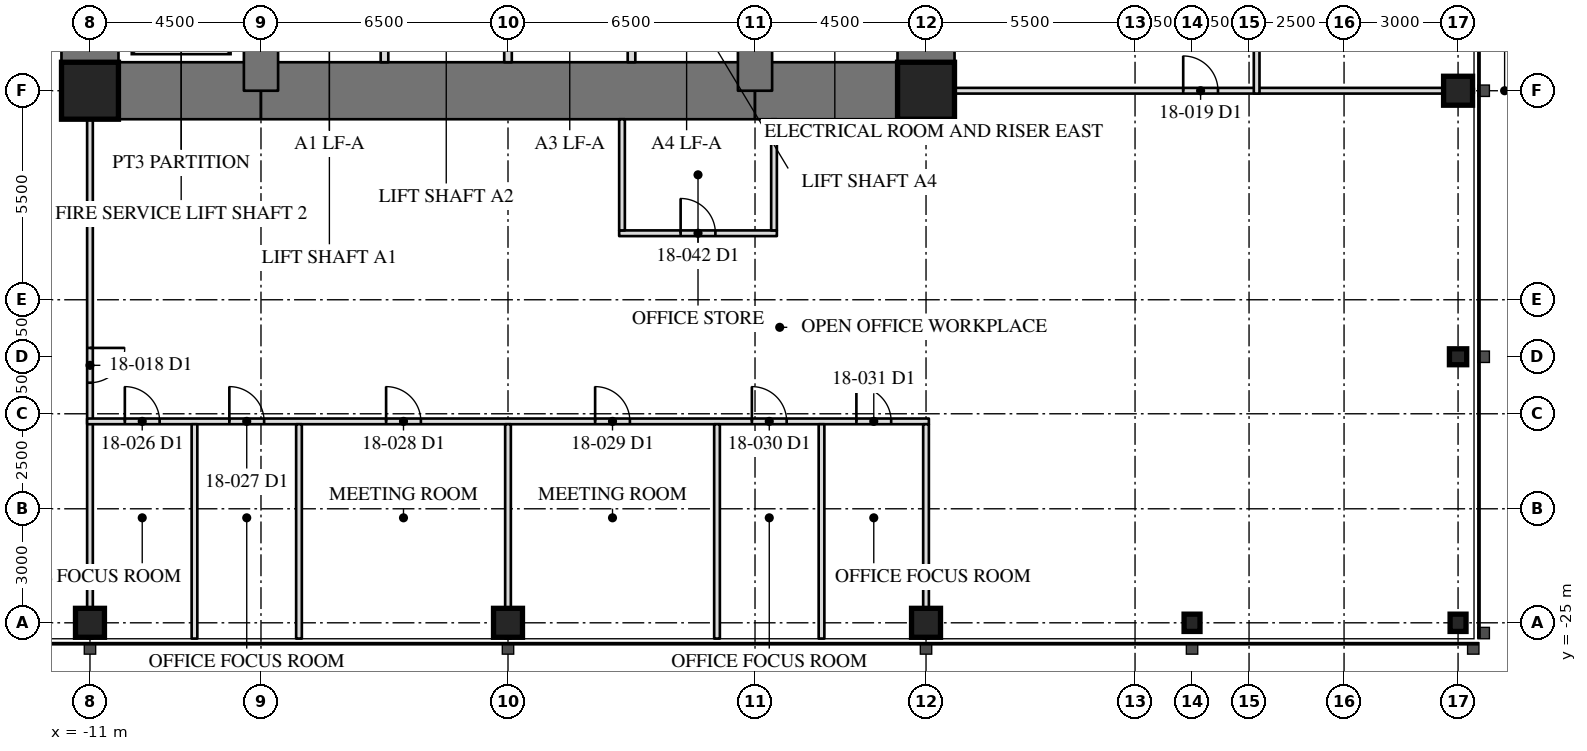
"""IFC4 building model, lengths in metres.
Left out: names, types, materials, properties, quantities, classifications, styles, units other than length and angle.
Written with IfcOpenShell. Run it as: python <this file> out.ifc"""

import sys

from ifc_helpers import new_model, si_unit, direction, frame, frame_2d, origin, origin_2d, place, context, subcontext, project, spatial, rectangle, hollow_rectangle, i_section, extrude, element, fill, save


model = new_model("IFC4")
c1 = context("Model", 3, precision=1e-05, world=origin(), true_north=direction((0.0, 1.0)))
c2 = subcontext(c1, "Body", "Model", "MODEL_VIEW")
j1 = project(units=[si_unit("LENGTHUNIT", "METRE"), si_unit("PLANEANGLEUNIT", "RADIAN")], contexts=[c1])
p1 = place(None, origin())
s1 = spatial("IfcSite", under=j1, at=p1, CompositionType="ELEMENT")
p2 = place(p1, origin())
s2 = spatial("IfcBuilding", under=s1, at=p2, CompositionType="ELEMENT")
p3 = place(p2, frame((0.0, 0.0, 77.5)))
s3 = spatial("IfcBuildingStorey", under=s2, at=p3, CompositionType="ELEMENT", Elevation=77.5)
for number, where, z_axis, x_axis in (
    (1, (-11.0, -25.0, 0.0), (0.0, 0.0, 1.0), (1.0, 0.0, 0.0)),
    (2, (0.0, -25.0, 0.0), (0.0, 0.0, 1.0), (1.0, 0.0, 0.0)),
    (3, (11.0, -25.0, 0.0), (0.0, 0.0, 1.0), (1.0, 0.0, 0.0)),
):
    element("IfcColumn", number, at=place(p3, frame(where, z_axis=z_axis, x_axis=x_axis)), inside=s3, PredefinedType="COLUMN", context=c2, shape_type="SweptSolid", body=[
        extrude(hollow_rectangle(XDim=0.762, YDim=0.762, WallThickness=0.127, at=origin_2d()), origin(), (0.0, 0.0, 1.0), 4.1),
    ])
for number, where, z_axis, x_axis in (
    (4, (18.0, -25.0, 0.0), (0.0, 0.0, 1.0), (1.0, 0.0, 0.0)),
    (5, (25.0, -25.0, 0.0), (0.0, 0.0, 1.0), (1.0, 0.0, 0.0)),
    (6, (25.0, -18.0, 0.0), (0.0, 0.0, 1.0), (0.0, 1.0, 0.0)),
):
    element("IfcColumn", number, at=place(p3, frame(where, z_axis=z_axis, x_axis=x_axis)), inside=s3, PredefinedType="COLUMN", context=c2, shape_type="SweptSolid", body=[
        extrude(i_section(OverallWidth=0.419, OverallDepth=0.455, WebThickness=0.042, FlangeThickness=0.068, at=origin_2d()), origin(), (0.0, 0.0, 1.0), 4.1),
    ])
p4 = place(p3, frame((25.0, -11.0, 0.0), z_axis=(0.0, 0.0, 1.0), x_axis=(0.0, 1.0, 0.0)))
e7 = element("IfcColumn", 7, at=p4, inside=s3, PredefinedType="COLUMN", context=c2, shape_type="SweptSolid", body=[
    extrude(hollow_rectangle(XDim=0.762, YDim=0.762, WallThickness=0.127, at=origin_2d()), origin(), (0.0, 0.0, 1.0), 4.1),
])
p5 = place(p3, frame((11.0, -11.0, 0.0), z_axis=(0.0, 0.0, 1.0), x_axis=(0.0, 1.0, 0.0)))
e8 = element("IfcWall", 8, at=p5, inside=s3, PredefinedType="SHEAR", context=c2, shape_type="SweptSolid", body=[
    extrude(rectangle(XDim=22.0, YDim=1.5, at=frame_2d((11.0, 0.0))), origin(), (0.0, 0.0, 1.0), 4.1),
])
p6 = place(p5, frame((15.393, 0.0, 0.0)))
e9 = element("IfcOpeningElement", 9, at=p6, cuts=e8, PredefinedType="OPENING", context=c2, shape_type="SweptSolid", body=[
    extrude(rectangle(XDim=0.915, YDim=2.134, at=frame_2d((0.458, 1.067))), frame((0.0, 0.76, 0.0), z_axis=(0.0, -1.0, 0.0), x_axis=(1.0, 0.0, 0.0)), (0.0, 0.0, 1.0), 1.52),
])
p7 = place(p3, frame((-11.0, 11.0, 0.0), z_axis=(0.0, 0.0, 1.0), x_axis=(0.0, -1.0, 0.0)))
e10 = element("IfcWall", 10, at=p7, inside=s3, PredefinedType="SHEAR", context=c2, shape_type="SweptSolid", body=[
    extrude(rectangle(XDim=22.0, YDim=1.5, at=frame_2d((11.0, 0.0))), origin(), (0.0, 0.0, 1.0), 4.1),
])
p8 = place(p7, frame((15.393, 0.0, 0.0)))
e11 = element("IfcOpeningElement", 11, at=p8, cuts=e10, PredefinedType="OPENING", context=c2, shape_type="SweptSolid", body=[
    extrude(rectangle(XDim=0.915, YDim=2.134, at=frame_2d((0.458, 1.067))), frame((0.0, 0.76, 0.0), z_axis=(0.0, -1.0, 0.0), x_axis=(1.0, 0.0, 0.0)), (0.0, 0.0, 1.0), 1.52),
])
p9 = place(p3, frame((-11.0, -11.0, 0.0), z_axis=(0.0, 0.0, 1.0), x_axis=(1.0, 0.0, 0.0)))
e12 = element("IfcWall", 12, at=p9, inside=s3, PredefinedType="SHEAR", context=c2, shape_type="SweptSolid", body=[
    extrude(rectangle(XDim=4.5, YDim=1.5, at=frame_2d((2.25, 0.0))), origin(), (0.0, 0.0, 1.0), 4.1),
])
p10 = place(p3, frame((-6.5, -11.0, 0.0), z_axis=(0.0, 0.0, 1.0), x_axis=(1.0, 0.0, 0.0)))
e13 = element("IfcWall", 13, at=p10, inside=s3, PredefinedType="SHEAR", context=c2, shape_type="SweptSolid", body=[
    extrude(rectangle(XDim=13.0, YDim=1.5, at=frame_2d((6.5, 0.0))), origin(), (0.0, 0.0, 1.0), 4.1),
])
p11 = place(p3, frame((6.5, -11.0, 0.0), z_axis=(0.0, 0.0, 1.0), x_axis=(1.0, 0.0, 0.0)))
e14 = element("IfcWall", 14, at=p11, inside=s3, PredefinedType="SHEAR", context=c2, shape_type="SweptSolid", body=[
    extrude(rectangle(XDim=4.5, YDim=1.5, at=frame_2d((2.25, 0.0))), origin(), (0.0, 0.0, 1.0), 4.1),
])
for number, where, z_axis, x_axis in (
    (15, (6.5, -11.0, 0.0), (0.0, 0.0, 1.0), (0.0, 1.0, 0.0)),
    (16, (-6.5, -6.5, 0.0), (0.0, 0.0, 1.0), (0.0, -1.0, 0.0)),
):
    element("IfcWall", number, at=place(p3, frame(where, z_axis=z_axis, x_axis=x_axis)), inside=s3, PredefinedType="SHEAR", context=c2, shape_type="SweptSolid", body=[
        extrude(rectangle(XDim=4.5, YDim=0.9, at=frame_2d((2.25, 0.0))), origin(), (0.0, 0.0, 1.0), 4.1),
    ])
for number, where, z_axis, x_axis in (
    (17, (-11.0, -11.0, 0.0), (0.0, 0.0, 1.0), (1.0, 0.0, 0.0)),
    (18, (11.0, -11.0, 0.0), (0.0, 0.0, 1.0), (1.0, 0.0, 0.0)),
):
    element("IfcColumn", number, at=place(p3, frame(where, z_axis=z_axis, x_axis=x_axis)), inside=s3, PredefinedType="COLUMN", context=c2, shape_type="SweptSolid", body=[
        extrude(hollow_rectangle(XDim=1.499, YDim=1.499, WallThickness=0.102, at=origin_2d()), origin(), (0.0, 0.0, 1.0), 4.1),
    ])
for number, where, z_axis, x_axis in (
    (19, (-3.25, -10.25, 0.0), (0.0, 0.0, 1.0), (0.0, 1.0, 0.0)),
    (20, (0.0, -10.25, 0.0), (0.0, 0.0, 1.0), (0.0, 1.0, 0.0)),
    (21, (3.25, -10.25, 0.0), (0.0, 0.0, 1.0), (0.0, 1.0, 0.0)),
):
    element("IfcWall", number, at=place(p3, frame(where, z_axis=z_axis, x_axis=x_axis)), inside=s3, PredefinedType="PARTITIONING", context=c2, shape_type="SweptSolid", body=[
        extrude(rectangle(XDim=3.3, YDim=0.2, at=frame_2d((1.65, 0.0))), origin(), (0.0, 0.0, 1.0), 3.91),
    ])
p12 = place(p3, frame((-11.0, -11.75, 0.0), z_axis=(0.0, 0.0, 1.0), x_axis=(0.0, -1.0, 0.0)))
e22 = element("IfcWall", 22, at=p12, inside=s3, PredefinedType="PARTITIONING", context=c2, shape_type="SweptSolid", body=[
    extrude(rectangle(XDim=13.665, YDim=0.15, at=frame_2d((6.833, 0.0))), origin(), (0.0, 0.0, 1.0), 3.13),
])
p13 = place(p12, frame((6.018, 0.0, 0.0)))
e23 = element("IfcOpeningElement", 23, at=p13, cuts=e22, PredefinedType="OPENING", context=c2, shape_type="SweptSolid", body=[
    extrude(rectangle(XDim=0.915, YDim=2.134, at=frame_2d((0.458, 1.067))), frame((0.0, 0.085, 0.0), z_axis=(0.0, -1.0, 0.0), x_axis=(1.0, 0.0, 0.0)), (0.0, 0.0, 1.0), 0.17),
])
p14 = place(p3, frame((11.75, -11.0, 0.0), z_axis=(0.0, 0.0, 1.0), x_axis=(1.0, 0.0, 0.0)))
e24 = element("IfcWall", 24, at=p14, inside=s3, PredefinedType="PARTITIONING", context=c2, shape_type="SweptSolid", body=[
    extrude(rectangle(XDim=13.665, YDim=0.15, at=frame_2d((6.833, 0.0))), origin(), (0.0, 0.0, 1.0), 3.13),
])
p15 = place(p14, frame((6.018, 0.0, 0.0)))
e25 = element("IfcOpeningElement", 25, at=p15, cuts=e24, PredefinedType="OPENING", context=c2, shape_type="SweptSolid", body=[
    extrude(rectangle(XDim=0.915, YDim=2.134, at=frame_2d((0.458, 1.067))), frame((0.0, 0.085, 0.0), z_axis=(0.0, -1.0, 0.0), x_axis=(1.0, 0.0, 0.0)), (0.0, 0.0, 1.0), 0.17),
])
p16 = place(p3, frame((-11.075, -19.7, 0.0), z_axis=(0.0, 0.0, 1.0), x_axis=(1.0, 0.0, 0.0)))
e26 = element("IfcWall", 26, at=p16, inside=s3, PredefinedType="PARTITIONING", context=c2, shape_type="SweptSolid", body=[
    extrude(rectangle(XDim=22.15, YDim=0.15, at=frame_2d((11.075, 0.0))), origin(), (0.0, 0.0, 1.0), 3.91),
])
p17 = place(p16, frame((0.992, 0.0, 0.0)))
e27 = element("IfcOpeningElement", 27, at=p17, cuts=e26, PredefinedType="OPENING", context=c2, shape_type="SweptSolid", body=[
    extrude(rectangle(XDim=0.915, YDim=2.134, at=frame_2d((0.458, 1.067))), frame((0.0, 0.085, 0.0), z_axis=(0.0, -1.0, 0.0), x_axis=(1.0, 0.0, 0.0)), (0.0, 0.0, 1.0), 0.17),
])
p18 = place(p16, frame((3.742, 0.0, 0.0)))
e28 = element("IfcOpeningElement", 28, at=p18, cuts=e26, PredefinedType="OPENING", context=c2, shape_type="SweptSolid", body=[
    extrude(rectangle(XDim=0.915, YDim=2.134, at=frame_2d((0.458, 1.067))), frame((0.0, 0.085, 0.0), z_axis=(0.0, -1.0, 0.0), x_axis=(1.0, 0.0, 0.0)), (0.0, 0.0, 1.0), 0.17),
])
p19 = place(p16, frame((7.867, 0.0, 0.0)))
e29 = element("IfcOpeningElement", 29, at=p19, cuts=e26, PredefinedType="OPENING", context=c2, shape_type="SweptSolid", body=[
    extrude(rectangle(XDim=0.915, YDim=2.134, at=frame_2d((0.458, 1.067))), frame((0.0, 0.085, 0.0), z_axis=(0.0, -1.0, 0.0), x_axis=(1.0, 0.0, 0.0)), (0.0, 0.0, 1.0), 0.17),
])
p20 = place(p16, frame((13.367, 0.0, 0.0)))
e30 = element("IfcOpeningElement", 30, at=p20, cuts=e26, PredefinedType="OPENING", context=c2, shape_type="SweptSolid", body=[
    extrude(rectangle(XDim=0.915, YDim=2.134, at=frame_2d((0.458, 1.067))), frame((0.0, 0.085, 0.0), z_axis=(0.0, -1.0, 0.0), x_axis=(1.0, 0.0, 0.0)), (0.0, 0.0, 1.0), 0.17),
])
p21 = place(p16, frame((17.492, 0.0, 0.0)))
e31 = element("IfcOpeningElement", 31, at=p21, cuts=e26, PredefinedType="OPENING", context=c2, shape_type="SweptSolid", body=[
    extrude(rectangle(XDim=0.915, YDim=2.134, at=frame_2d((0.458, 1.067))), frame((0.0, 0.085, 0.0), z_axis=(0.0, -1.0, 0.0), x_axis=(1.0, 0.0, 0.0)), (0.0, 0.0, 1.0), 0.17),
])
p22 = place(p16, frame((20.242, 0.0, 0.0)))
e32 = element("IfcOpeningElement", 32, at=p22, cuts=e26, PredefinedType="OPENING", context=c2, shape_type="SweptSolid", body=[
    extrude(rectangle(XDim=0.915, YDim=2.134, at=frame_2d((0.458, 1.067))), frame((0.0, 0.085, 0.0), z_axis=(0.0, -1.0, 0.0), x_axis=(1.0, 0.0, 0.0)), (0.0, 0.0, 1.0), 0.17),
])
for number, where, z_axis, x_axis in (
    (33, (-8.25, -19.775, 0.0), (0.0, 0.0, 1.0), (0.0, -1.0, 0.0)),
    (34, (-5.5, -19.775, 0.0), (0.0, 0.0, 1.0), (0.0, -1.0, 0.0)),
):
    element("IfcWall", number, at=place(p3, frame(where, z_axis=z_axis, x_axis=x_axis)), inside=s3, PredefinedType="PARTITIONING", context=c2, shape_type="SweptSolid", body=[
        extrude(rectangle(XDim=5.64, YDim=0.15, at=frame_2d((2.82, 0.0))), origin(), (0.0, 0.0, 1.0), 3.91),
    ])
p23 = place(p3, frame((0.0, -19.775, 0.0), z_axis=(0.0, 0.0, 1.0), x_axis=(0.0, -1.0, 0.0)))
e35 = element("IfcWall", 35, at=p23, inside=s3, PredefinedType="PARTITIONING", context=c2, shape_type="SweptSolid", body=[
    extrude(rectangle(XDim=5.64, YDim=0.15, at=frame_2d((2.82, 0.0))), origin(), (0.0, 0.0, 1.0), 3.13),
])
for number, where, z_axis, x_axis in (
    (36, (5.5, -19.775, 0.0), (0.0, 0.0, 1.0), (0.0, -1.0, 0.0)),
    (37, (8.25, -19.775, 0.0), (0.0, 0.0, 1.0), (0.0, -1.0, 0.0)),
):
    element("IfcWall", number, at=place(p3, frame(where, z_axis=z_axis, x_axis=x_axis)), inside=s3, PredefinedType="PARTITIONING", context=c2, shape_type="SweptSolid", body=[
        extrude(rectangle(XDim=5.64, YDim=0.15, at=frame_2d((2.82, 0.0))), origin(), (0.0, 0.0, 1.0), 3.91),
    ])
p24 = place(p3, frame((11.0, -19.775, 0.0), z_axis=(0.0, 0.0, 1.0), x_axis=(0.0, -1.0, 0.0)))
e38 = element("IfcWall", 38, at=p24, inside=s3, PredefinedType="PARTITIONING", context=c2, shape_type="SweptSolid", body=[
    extrude(rectangle(XDim=5.64, YDim=0.15, at=frame_2d((2.82, 0.0))), origin(), (0.0, 0.0, 1.0), 3.13),
])
p25 = place(p3, frame((19.7, -11.075, 0.0), z_axis=(0.0, 0.0, 1.0), x_axis=(0.0, 1.0, 0.0)))
e39 = element("IfcWall", 39, at=p25, inside=s3, PredefinedType="PARTITIONING", context=c2, shape_type="SweptSolid", body=[
    extrude(rectangle(XDim=22.15, YDim=0.15, at=frame_2d((11.075, 0.0))), origin(), (0.0, 0.0, 1.0), 3.91),
])
p26 = place(p25, frame((2.367, 0.0, 0.0)))
e40 = element("IfcOpeningElement", 40, at=p26, cuts=e39, PredefinedType="OPENING", context=c2, shape_type="SweptSolid", body=[
    extrude(rectangle(XDim=0.915, YDim=2.134, at=frame_2d((0.458, 1.067))), frame((0.0, 0.085, 0.0), z_axis=(0.0, -1.0, 0.0), x_axis=(1.0, 0.0, 0.0)), (0.0, 0.0, 1.0), 0.17),
])
p27 = place(p25, frame((7.867, 0.0, 0.0)))
e41 = element("IfcOpeningElement", 41, at=p27, cuts=e39, PredefinedType="OPENING", context=c2, shape_type="SweptSolid", body=[
    extrude(rectangle(XDim=0.915, YDim=2.134, at=frame_2d((0.458, 1.067))), frame((0.0, 0.085, 0.0), z_axis=(0.0, -1.0, 0.0), x_axis=(1.0, 0.0, 0.0)), (0.0, 0.0, 1.0), 0.17),
])
p28 = place(p25, frame((13.367, 0.0, 0.0)))
e42 = element("IfcOpeningElement", 42, at=p28, cuts=e39, PredefinedType="OPENING", context=c2, shape_type="SweptSolid", body=[
    extrude(rectangle(XDim=0.915, YDim=2.134, at=frame_2d((0.458, 1.067))), frame((0.0, 0.085, 0.0), z_axis=(0.0, -1.0, 0.0), x_axis=(1.0, 0.0, 0.0)), (0.0, 0.0, 1.0), 0.17),
])
p29 = place(p25, frame((18.867, 0.0, 0.0)))
e43 = element("IfcOpeningElement", 43, at=p29, cuts=e39, PredefinedType="OPENING", context=c2, shape_type="SweptSolid", body=[
    extrude(rectangle(XDim=0.915, YDim=2.134, at=frame_2d((0.458, 1.067))), frame((0.0, 0.085, 0.0), z_axis=(0.0, -1.0, 0.0), x_axis=(1.0, 0.0, 0.0)), (0.0, 0.0, 1.0), 0.17),
])
p30 = place(p3, frame((2.925, -14.75, 0.0), z_axis=(0.0, 0.0, 1.0), x_axis=(1.0, 0.0, 0.0)))
e44 = element("IfcWall", 44, at=p30, inside=s3, PredefinedType="PARTITIONING", context=c2, shape_type="SweptSolid", body=[
    extrude(rectangle(XDim=4.15, YDim=0.15, at=frame_2d((2.075, 0.0))), origin(), (0.0, 0.0, 1.0), 3.91),
])
p31 = place(p30, frame((1.617, 0.0, 0.0)))
e45 = element("IfcOpeningElement", 45, at=p31, cuts=e44, PredefinedType="OPENING", context=c2, shape_type="SweptSolid", body=[
    extrude(rectangle(XDim=0.915, YDim=2.134, at=frame_2d((0.458, 1.067))), frame((0.0, 0.085, 0.0), z_axis=(0.0, -1.0, 0.0), x_axis=(1.0, 0.0, 0.0)), (0.0, 0.0, 1.0), 0.17),
])
for number, where, z_axis, x_axis in (
    (46, (3.0, -14.675, 0.0), (0.0, 0.0, 1.0), (0.0, 1.0, 0.0)),
    (47, (7.0, -14.675, 0.0), (0.0, 0.0, 1.0), (0.0, 1.0, 0.0)),
):
    element("IfcWall", number, at=place(p3, frame(where, z_axis=z_axis, x_axis=x_axis)), inside=s3, PredefinedType="PARTITIONING", context=c2, shape_type="SweptSolid", body=[
        extrude(rectangle(XDim=2.925, YDim=0.15, at=frame_2d((1.462, 0.0))), origin(), (0.0, 0.0, 1.0), 3.91),
    ])
p32 = place(p13, origin())
e48 = element("IfcDoor", 48, at=p32, inside=s3, OperationType="SINGLE_SWING_LEFT", PredefinedType="DOOR", context=c2, shape_type="SweptSolid", body=[
    extrude(rectangle(XDim=0.915, YDim=2.134, at=frame_2d((0.458, 1.067))), frame((0.0, 0.025, 0.0), z_axis=(0.0, -1.0, 0.0), x_axis=(1.0, 0.0, 0.0)), (0.0, 0.0, 1.0), 0.05),
])
fill(e23, e48)
p33 = place(p15, origin())
e49 = element("IfcDoor", 49, at=p33, inside=s3, OperationType="SINGLE_SWING_LEFT", PredefinedType="DOOR", context=c2, shape_type="SweptSolid", body=[
    extrude(rectangle(XDim=0.915, YDim=2.134, at=frame_2d((0.458, 1.067))), frame((0.0, 0.025, 0.0), z_axis=(0.0, -1.0, 0.0), x_axis=(1.0, 0.0, 0.0)), (0.0, 0.0, 1.0), 0.05),
])
fill(e25, e49)
p34 = place(p17, origin())
e50 = element("IfcDoor", 50, at=p34, inside=s3, OperationType="SINGLE_SWING_LEFT", PredefinedType="DOOR", context=c2, shape_type="SweptSolid", body=[
    extrude(rectangle(XDim=0.915, YDim=2.134, at=frame_2d((0.458, 1.067))), frame((0.0, 0.025, 0.0), z_axis=(0.0, -1.0, 0.0), x_axis=(1.0, 0.0, 0.0)), (0.0, 0.0, 1.0), 0.05),
])
fill(e27, e50)
p35 = place(p18, origin())
e51 = element("IfcDoor", 51, at=p35, inside=s3, OperationType="SINGLE_SWING_LEFT", PredefinedType="DOOR", context=c2, shape_type="SweptSolid", body=[
    extrude(rectangle(XDim=0.915, YDim=2.134, at=frame_2d((0.458, 1.067))), frame((0.0, 0.025, 0.0), z_axis=(0.0, -1.0, 0.0), x_axis=(1.0, 0.0, 0.0)), (0.0, 0.0, 1.0), 0.05),
])
fill(e28, e51)
p36 = place(p19, origin())
e52 = element("IfcDoor", 52, at=p36, inside=s3, OperationType="SINGLE_SWING_LEFT", PredefinedType="DOOR", context=c2, shape_type="SweptSolid", body=[
    extrude(rectangle(XDim=0.915, YDim=2.134, at=frame_2d((0.458, 1.067))), frame((0.0, 0.025, 0.0), z_axis=(0.0, -1.0, 0.0), x_axis=(1.0, 0.0, 0.0)), (0.0, 0.0, 1.0), 0.05),
])
fill(e29, e52)
p37 = place(p20, origin())
e53 = element("IfcDoor", 53, at=p37, inside=s3, OperationType="SINGLE_SWING_LEFT", PredefinedType="DOOR", context=c2, shape_type="SweptSolid", body=[
    extrude(rectangle(XDim=0.915, YDim=2.134, at=frame_2d((0.458, 1.067))), frame((0.0, 0.025, 0.0), z_axis=(0.0, -1.0, 0.0), x_axis=(1.0, 0.0, 0.0)), (0.0, 0.0, 1.0), 0.05),
])
fill(e30, e53)
p38 = place(p21, origin())
e54 = element("IfcDoor", 54, at=p38, inside=s3, OperationType="SINGLE_SWING_LEFT", PredefinedType="DOOR", context=c2, shape_type="SweptSolid", body=[
    extrude(rectangle(XDim=0.915, YDim=2.134, at=frame_2d((0.458, 1.067))), frame((0.0, 0.025, 0.0), z_axis=(0.0, -1.0, 0.0), x_axis=(1.0, 0.0, 0.0)), (0.0, 0.0, 1.0), 0.05),
])
fill(e31, e54)
p39 = place(p22, origin())
e55 = element("IfcDoor", 55, at=p39, inside=s3, OperationType="SINGLE_SWING_LEFT", PredefinedType="DOOR", context=c2, shape_type="SweptSolid", body=[
    extrude(rectangle(XDim=0.915, YDim=2.134, at=frame_2d((0.458, 1.067))), frame((0.0, 0.025, 0.0), z_axis=(0.0, -1.0, 0.0), x_axis=(1.0, 0.0, 0.0)), (0.0, 0.0, 1.0), 0.05),
])
fill(e32, e55)
p40 = place(p31, origin())
e56 = element("IfcDoor", 56, at=p40, inside=s3, OperationType="SINGLE_SWING_LEFT", PredefinedType="DOOR", context=c2, shape_type="SweptSolid", body=[
    extrude(rectangle(XDim=0.915, YDim=2.134, at=frame_2d((0.458, 1.067))), frame((0.0, 0.025, 0.0), z_axis=(0.0, -1.0, 0.0), x_axis=(1.0, 0.0, 0.0)), (0.0, 0.0, 1.0), 0.05),
])
fill(e45, e56)
save(model, sys.argv[1])
